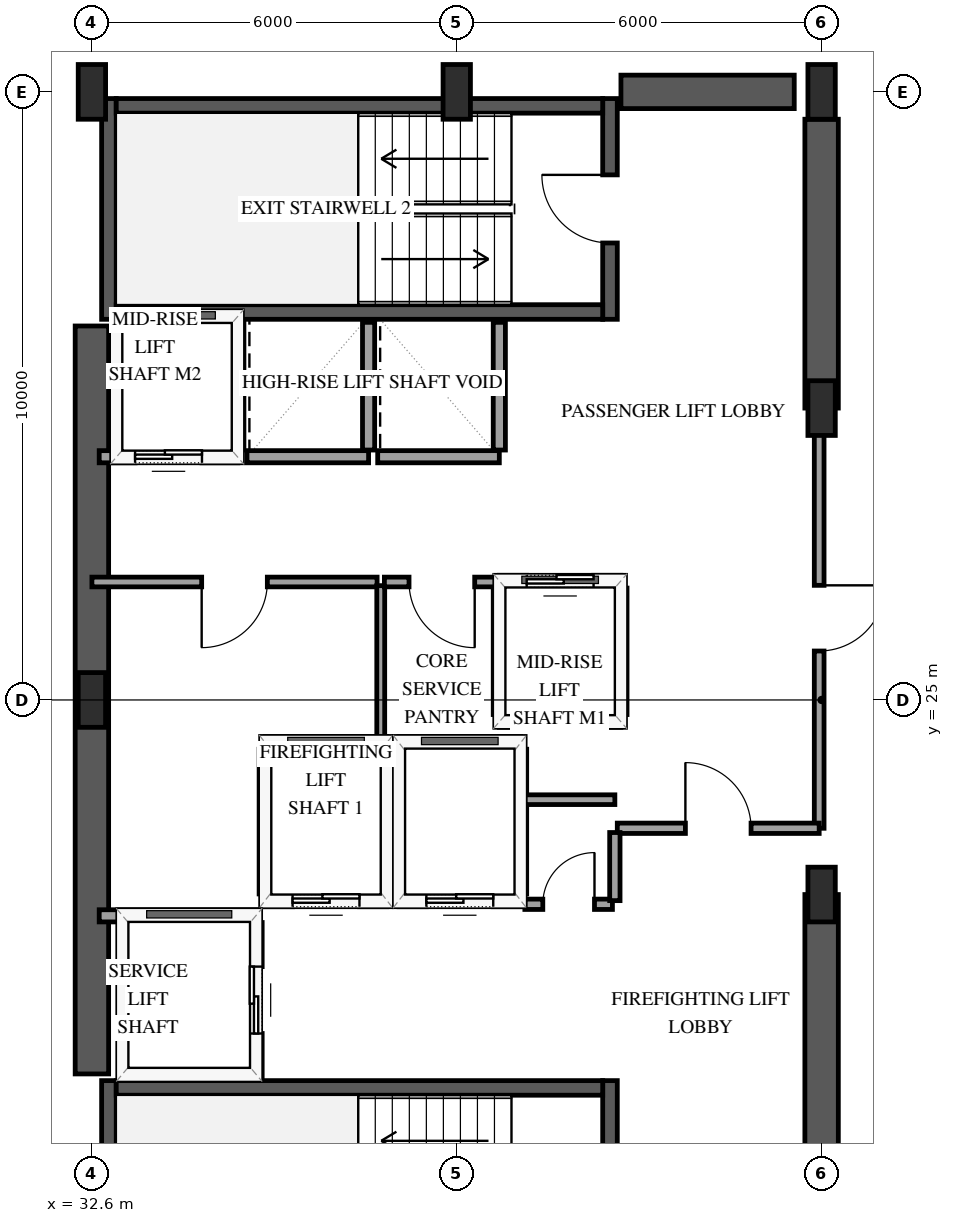
"""IFC4 building model, lengths in metres.
Left out: names, types, materials, properties, quantities, classifications, styles, units other than length and angle.
Written with IfcOpenShell. Run it as: python <this file> out.ifc"""

import sys

from ifc_helpers import new_model, si_unit, direction, frame, frame_2d, origin, origin_2d, place, context, subcontext, project, spatial, rectangle, extrude, element, fill, save


model = new_model("IFC4")
c1 = context("Model", 3, precision=1e-05, world=origin(), true_north=direction((0.0, 1.0)))
c2 = subcontext(c1, "Body", "Model", "MODEL_VIEW")
j1 = project(units=[si_unit("LENGTHUNIT", "METRE"), si_unit("PLANEANGLEUNIT", "RADIAN")], contexts=[c1])
p1 = place(None, origin())
s1 = spatial("IfcSite", under=j1, at=p1, CompositionType="ELEMENT")
p2 = place(p1, origin())
s2 = spatial("IfcBuilding", under=s1, at=p2, CompositionType="ELEMENT")
p3 = place(p2, frame((0.0, 0.0, 142.6)))
s3 = spatial("IfcBuildingStorey", under=s2, at=p3, CompositionType="ELEMENT", Elevation=142.6)
p4 = place(p3, frame((32.88, 15.11, 0.0), z_axis=(0.0, 0.0, 1.0), x_axis=(0.0, 1.0, 0.0)))
e1 = element("IfcWall", 1, at=p4, inside=s3, PredefinedType="SHEAR", context=c2, shape_type="SweptSolid", body=[
    extrude(rectangle(XDim=3.63, YDim=0.24, at=frame_2d((1.815, 0.0))), origin(), (0.0, 0.0, 1.0), 3.6),
])
p5 = place(p3, frame((41.12, 15.11, 0.0), z_axis=(0.0, 0.0, 1.0), x_axis=(0.0, 1.0, 0.0)))
e2 = element("IfcWall", 2, at=p5, inside=s3, PredefinedType="SHEAR", context=c2, shape_type="SweptSolid", body=[
    extrude(rectangle(XDim=3.63, YDim=0.24, at=frame_2d((1.815, 0.0))), origin(), (0.0, 0.0, 1.0), 3.6),
])
p6 = place(p5, frame((1.255, 0.0, 0.0)))
e3 = element("IfcOpeningElement", 3, at=p6, cuts=e2, PredefinedType="OPENING", context=c2, shape_type="SweptSolid", body=[
    extrude(rectangle(XDim=1.12, YDim=2.15, at=frame_2d((0.56, 1.075))), frame((0.0, 0.13, 0.0), z_axis=(0.0, -1.0, 0.0), x_axis=(1.0, 0.0, 0.0)), (0.0, 0.0, 1.0), 0.26),
])
p7 = place(p3, frame((33.0, 18.62, 0.0), z_axis=(0.0, 0.0, 1.0), x_axis=(1.0, 0.0, 0.0)))
e4 = element("IfcWall", 4, at=p7, inside=s3, PredefinedType="SHEAR", context=c2, shape_type="SweptSolid", body=[
    extrude(rectangle(XDim=8.0, YDim=0.24, at=frame_2d((4.0, 0.0))), origin(), (0.0, 0.0, 1.0), 3.6),
])
p8 = place(p3, frame((32.88, 31.26, 0.0), z_axis=(0.0, 0.0, 1.0), x_axis=(0.0, 1.0, 0.0)))
e5 = element("IfcWall", 5, at=p8, inside=s3, PredefinedType="SHEAR", context=c2, shape_type="SweptSolid", body=[
    extrude(rectangle(XDim=3.63, YDim=0.24, at=frame_2d((1.815, 0.0))), origin(), (0.0, 0.0, 1.0), 3.6),
])
p9 = place(p3, frame((41.12, 31.26, 0.0), z_axis=(0.0, 0.0, 1.0), x_axis=(0.0, 1.0, 0.0)))
e6 = element("IfcWall", 6, at=p9, inside=s3, PredefinedType="SHEAR", context=c2, shape_type="SweptSolid", body=[
    extrude(rectangle(XDim=3.63, YDim=0.24, at=frame_2d((1.815, 0.0))), origin(), (0.0, 0.0, 1.0), 3.6),
])
p10 = place(p9, frame((1.255, 0.0, 0.0)))
e7 = element("IfcOpeningElement", 7, at=p10, cuts=e6, PredefinedType="OPENING", context=c2, shape_type="SweptSolid", body=[
    extrude(rectangle(XDim=1.12, YDim=2.15, at=frame_2d((0.56, 1.075))), frame((0.0, 0.13, 0.0), z_axis=(0.0, -1.0, 0.0), x_axis=(1.0, 0.0, 0.0)), (0.0, 0.0, 1.0), 0.26),
])
for number, where, z_axis, x_axis in (
    (8, (33.0, 31.38, 0.0), (0.0, 0.0, 1.0), (1.0, 0.0, 0.0)),
    (9, (33.0, 34.77, 0.0), (0.0, 0.0, 1.0), (1.0, 0.0, 0.0)),
):
    element("IfcWall", number, at=place(p3, frame(where, z_axis=z_axis, x_axis=x_axis)), inside=s3, PredefinedType="SHEAR", context=c2, shape_type="SweptSolid", body=[
        extrude(rectangle(XDim=8.0, YDim=0.24, at=frame_2d((4.0, 0.0))), origin(), (0.0, 0.0, 1.0), 3.6),
    ])
p11 = place(p3, frame((32.6, 18.85, 0.0), z_axis=(0.0, 0.0, 1.0), x_axis=(0.0, 1.0, 0.0)))
e10 = element("IfcWall", 10, at=p11, inside=s3, PredefinedType="SHEAR", context=c2, shape_type="SweptSolid", body=[
    extrude(rectangle(XDim=12.3, YDim=0.55, at=frame_2d((6.15, 0.0))), origin(), (0.0, 0.0, 1.0), 3.6),
])
p12 = place(p3, frame((41.3, 35.0, 0.0), z_axis=(0.0, 0.0, 1.0), x_axis=(1.0, 0.0, 0.0)))
e11 = element("IfcWall", 11, at=p12, inside=s3, PredefinedType="SHEAR", context=c2, shape_type="SweptSolid", body=[
    extrude(rectangle(XDim=2.85, YDim=0.55, at=frame_2d((1.425, 0.0))), origin(), (0.0, 0.0, 1.0), 3.6),
])
p13 = place(p3, frame((44.6, 15.45, 0.0), z_axis=(0.0, 0.0, 1.0), x_axis=(0.0, 1.0, 0.0)))
e12 = element("IfcWall", 12, at=p13, inside=s3, PredefinedType="SHEAR", context=c2, shape_type="SweptSolid", body=[
    extrude(rectangle(XDim=6.35, YDim=0.55, at=frame_2d((3.175, 0.0))), origin(), (0.0, 0.0, 1.0), 3.6),
])
p14 = place(p3, frame((44.6, 29.8, 0.0), z_axis=(0.0, 0.0, 1.0), x_axis=(0.0, 1.0, 0.0)))
e13 = element("IfcWall", 13, at=p14, inside=s3, PredefinedType="SHEAR", context=c2, shape_type="SweptSolid", body=[
    extrude(rectangle(XDim=4.75, YDim=0.55, at=frame_2d((2.375, 0.0))), origin(), (0.0, 0.0, 1.0), 3.6),
])
for number, where, z_axis, x_axis in (
    (14, (32.6, 25.0, 0.0), (0.0, 0.0, 1.0), (1.0, 0.0, 0.0)),
    (15, (32.6, 35.0, 0.0), (0.0, 0.0, 1.0), (1.0, 0.0, 0.0)),
    (16, (38.6, 35.0, 0.0), (0.0, 0.0, 1.0), (1.0, 0.0, 0.0)),
    (17, (44.6, 21.8, 0.0), (0.0, 0.0, 1.0), (1.0, 0.0, 0.0)),
    (18, (44.6, 29.8, 0.0), (0.0, 0.0, 1.0), (1.0, 0.0, 0.0)),
    (19, (44.6, 35.0, 0.0), (0.0, 0.0, 1.0), (1.0, 0.0, 0.0)),
):
    element("IfcColumn", number, at=place(p3, frame(where, z_axis=z_axis, x_axis=x_axis)), inside=s3, PredefinedType="PILASTER", context=c2, shape_type="SweptSolid", body=[
        extrude(rectangle(XDim=0.45, YDim=0.9, at=origin_2d()), origin(), (0.0, 0.0, 1.0), 3.6),
    ])
p15 = place(p3, frame((35.45, 21.7, 0.0), z_axis=(0.0, 0.0, 1.0), x_axis=(1.0, 0.0, 0.0)))
e20 = element("IfcWall", 20, at=p15, inside=s3, PredefinedType="SOLIDWALL", context=c2, shape_type="SweptSolid", body=[
    extrude(rectangle(XDim=2.0, YDim=0.2, at=frame_2d((1.0, 0.0))), origin(), (0.0, 0.0, 1.0), 3.3),
])
p16 = place(p15, frame((0.45, 0.0, 0.0)))
e21 = element("IfcOpeningElement", 21, at=p16, cuts=e20, PredefinedType="OPENING", context=c2, shape_type="SweptSolid", body=[
    extrude(rectangle(XDim=1.1, YDim=2.15, at=frame_2d((0.55, 1.075))), frame((0.0, 0.11, 0.0), z_axis=(0.0, -1.0, 0.0), x_axis=(1.0, 0.0, 0.0)), (0.0, 0.0, 1.0), 0.22),
])
p17 = place(p3, frame((35.45, 24.3, 0.0), z_axis=(0.0, 0.0, 1.0), x_axis=(1.0, 0.0, 0.0)))
e22 = element("IfcWall", 22, at=p17, inside=s3, PredefinedType="SOLIDWALL", context=c2, shape_type="SweptSolid", body=[
    extrude(rectangle(XDim=2.0, YDim=0.2, at=frame_2d((1.0, 0.0))), origin(), (0.0, 0.0, 1.0), 3.3),
])
for number, where, z_axis, x_axis in (
    (23, (35.45, 21.81, 0.0), (0.0, 0.0, 1.0), (0.0, 1.0, 0.0)),
    (24, (37.45, 21.81, 0.0), (0.0, 0.0, 1.0), (0.0, 1.0, 0.0)),
):
    element("IfcWall", number, at=place(p3, frame(where, z_axis=z_axis, x_axis=x_axis)), inside=s3, PredefinedType="SOLIDWALL", context=c2, shape_type="SweptSolid", body=[
        extrude(rectangle(XDim=2.38, YDim=0.2, at=frame_2d((1.19, 0.0))), origin(), (0.0, 0.0, 1.0), 3.3),
    ])
p18 = place(p3, frame((37.65, 21.7, 0.0), z_axis=(0.0, 0.0, 1.0), x_axis=(1.0, 0.0, 0.0)))
e25 = element("IfcWall", 25, at=p18, inside=s3, PredefinedType="SOLIDWALL", context=c2, shape_type="SweptSolid", body=[
    extrude(rectangle(XDim=2.0, YDim=0.2, at=frame_2d((1.0, 0.0))), origin(), (0.0, 0.0, 1.0), 3.3),
])
p19 = place(p18, frame((0.45, 0.0, 0.0)))
e26 = element("IfcOpeningElement", 26, at=p19, cuts=e25, PredefinedType="OPENING", context=c2, shape_type="SweptSolid", body=[
    extrude(rectangle(XDim=1.1, YDim=2.15, at=frame_2d((0.55, 1.075))), frame((0.0, 0.11, 0.0), z_axis=(0.0, -1.0, 0.0), x_axis=(1.0, 0.0, 0.0)), (0.0, 0.0, 1.0), 0.22),
])
p20 = place(p3, frame((37.65, 24.3, 0.0), z_axis=(0.0, 0.0, 1.0), x_axis=(1.0, 0.0, 0.0)))
e27 = element("IfcWall", 27, at=p20, inside=s3, PredefinedType="SOLIDWALL", context=c2, shape_type="SweptSolid", body=[
    extrude(rectangle(XDim=2.0, YDim=0.2, at=frame_2d((1.0, 0.0))), origin(), (0.0, 0.0, 1.0), 3.3),
])
p21 = place(p3, frame((39.65, 21.81, 0.0), z_axis=(0.0, 0.0, 1.0), x_axis=(0.0, 1.0, 0.0)))
e28 = element("IfcWall", 28, at=p21, inside=s3, PredefinedType="SOLIDWALL", context=c2, shape_type="SweptSolid", body=[
    extrude(rectangle(XDim=2.38, YDim=0.2, at=frame_2d((1.19, 0.0))), origin(), (0.0, 0.0, 1.0), 3.3),
])
p22 = place(p3, frame((32.72, 21.45, 0.0), z_axis=(0.0, 0.0, 1.0), x_axis=(1.0, 0.0, 0.0)))
e29 = element("IfcWall", 29, at=p22, inside=s3, PredefinedType="SOLIDWALL", context=c2, shape_type="SweptSolid", body=[
    extrude(rectangle(XDim=2.58, YDim=0.2, at=frame_2d((1.29, 0.0))), origin(), (0.0, 0.0, 1.0), 3.3),
])
p23 = place(p3, frame((35.3, 18.79, 0.0), z_axis=(0.0, 0.0, 1.0), x_axis=(0.0, 1.0, 0.0)))
e30 = element("IfcWall", 30, at=p23, inside=s3, PredefinedType="SOLIDWALL", context=c2, shape_type="SweptSolid", body=[
    extrude(rectangle(XDim=2.55, YDim=0.2, at=frame_2d((1.275, 0.0))), origin(), (0.0, 0.0, 1.0), 3.3),
])
p24 = place(p23, frame((0.725, 0.0, 0.0)))
e31 = element("IfcOpeningElement", 31, at=p24, cuts=e30, PredefinedType="OPENING", context=c2, shape_type="SweptSolid", body=[
    extrude(rectangle(XDim=1.1, YDim=2.15, at=frame_2d((0.55, 1.075))), frame((0.0, 0.11, 0.0), z_axis=(0.0, -1.0, 0.0), x_axis=(1.0, 0.0, 0.0)), (0.0, 0.0, 1.0), 0.22),
])
p25 = place(p3, frame((39.3, 24.65, 0.0), z_axis=(0.0, 0.0, 1.0), x_axis=(1.0, 0.0, 0.0)))
e32 = element("IfcWall", 32, at=p25, inside=s3, PredefinedType="SOLIDWALL", context=c2, shape_type="SweptSolid", body=[
    extrude(rectangle(XDim=2.0, YDim=0.2, at=frame_2d((1.0, 0.0))), origin(), (0.0, 0.0, 1.0), 3.3),
])
p26 = place(p3, frame((39.3, 26.95, 0.0), z_axis=(0.0, 0.0, 1.0), x_axis=(1.0, 0.0, 0.0)))
e33 = element("IfcWall", 33, at=p26, inside=s3, PredefinedType="SOLIDWALL", context=c2, shape_type="SweptSolid", body=[
    extrude(rectangle(XDim=2.0, YDim=0.2, at=frame_2d((1.0, 0.0))), origin(), (0.0, 0.0, 1.0), 3.3),
])
p27 = place(p26, frame((0.45, 0.0, 0.0)))
e34 = element("IfcOpeningElement", 34, at=p27, cuts=e33, PredefinedType="OPENING", context=c2, shape_type="SweptSolid", body=[
    extrude(rectangle(XDim=1.1, YDim=2.15, at=frame_2d((0.55, 1.075))), frame((0.0, 0.11, 0.0), z_axis=(0.0, -1.0, 0.0), x_axis=(1.0, 0.0, 0.0)), (0.0, 0.0, 1.0), 0.22),
])
for number, where, z_axis, x_axis in (
    (35, (39.3, 24.76, 0.0), (0.0, 0.0, 1.0), (0.0, 1.0, 0.0)),
    (36, (41.3, 24.76, 0.0), (0.0, 0.0, 1.0), (0.0, 1.0, 0.0)),
):
    element("IfcWall", number, at=place(p3, frame(where, z_axis=z_axis, x_axis=x_axis)), inside=s3, PredefinedType="SOLIDWALL", context=c2, shape_type="SweptSolid", body=[
        extrude(rectangle(XDim=2.08, YDim=0.2, at=frame_2d((1.04, 0.0))), origin(), (0.0, 0.0, 1.0), 3.3),
    ])
p28 = place(p3, frame((32.72, 29.0, 0.0), z_axis=(0.0, 0.0, 1.0), x_axis=(1.0, 0.0, 0.0)))
e37 = element("IfcWall", 37, at=p28, inside=s3, PredefinedType="SOLIDWALL", context=c2, shape_type="SweptSolid", body=[
    extrude(rectangle(XDim=2.28, YDim=0.2, at=frame_2d((1.14, 0.0))), origin(), (0.0, 0.0, 1.0), 3.3),
])
p29 = place(p28, frame((0.59, 0.0, 0.0)))
e38 = element("IfcOpeningElement", 38, at=p29, cuts=e37, PredefinedType="OPENING", context=c2, shape_type="SweptSolid", body=[
    extrude(rectangle(XDim=1.1, YDim=2.15, at=frame_2d((0.55, 1.075))), frame((0.0, 0.11, 0.0), z_axis=(0.0, -1.0, 0.0), x_axis=(1.0, 0.0, 0.0)), (0.0, 0.0, 1.0), 0.22),
])
p30 = place(p3, frame((35.0, 29.11, 0.0), z_axis=(0.0, 0.0, 1.0), x_axis=(0.0, 1.0, 0.0)))
e39 = element("IfcWall", 39, at=p30, inside=s3, PredefinedType="SOLIDWALL", context=c2, shape_type="SweptSolid", body=[
    extrude(rectangle(XDim=2.1, YDim=0.2, at=frame_2d((1.05, 0.0))), origin(), (0.0, 0.0, 1.0), 3.3),
])
p31 = place(p3, frame((35.15, 29.0, 0.0), z_axis=(0.0, 0.0, 1.0), x_axis=(1.0, 0.0, 0.0)))
e40 = element("IfcWall", 40, at=p31, inside=s3, PredefinedType="SOLIDWALL", context=c2, shape_type="SweptSolid", body=[
    extrude(rectangle(XDim=2.0, YDim=0.2, at=frame_2d((1.0, 0.0))), origin(), (0.0, 0.0, 1.0), 3.3),
])
p32 = place(p3, frame((37.15, 29.11, 0.0), z_axis=(0.0, 0.0, 1.0), x_axis=(0.0, 1.0, 0.0)))
e41 = element("IfcWall", 41, at=p32, inside=s3, PredefinedType="SOLIDWALL", context=c2, shape_type="SweptSolid", body=[
    extrude(rectangle(XDim=2.1, YDim=0.2, at=frame_2d((1.05, 0.0))), origin(), (0.0, 0.0, 1.0), 3.3),
])
p33 = place(p3, frame((37.3, 29.0, 0.0), z_axis=(0.0, 0.0, 1.0), x_axis=(1.0, 0.0, 0.0)))
e42 = element("IfcWall", 42, at=p33, inside=s3, PredefinedType="SOLIDWALL", context=c2, shape_type="SweptSolid", body=[
    extrude(rectangle(XDim=2.0, YDim=0.2, at=frame_2d((1.0, 0.0))), origin(), (0.0, 0.0, 1.0), 3.3),
])
p34 = place(p3, frame((39.3, 29.11, 0.0), z_axis=(0.0, 0.0, 1.0), x_axis=(0.0, 1.0, 0.0)))
e43 = element("IfcWall", 43, at=p34, inside=s3, PredefinedType="SOLIDWALL", context=c2, shape_type="SweptSolid", body=[
    extrude(rectangle(XDim=2.1, YDim=0.2, at=frame_2d((1.05, 0.0))), origin(), (0.0, 0.0, 1.0), 3.3),
])
p35 = place(p3, frame((44.56, 29.8, 0.0), z_axis=(0.0, 0.0, 1.0), x_axis=(0.0, -1.0, 0.0)))
e44 = element("IfcWall", 44, at=p35, inside=s3, PredefinedType="PARTITIONING", context=c2, shape_type="SweptSolid", body=[
    extrude(rectangle(XDim=6.91, YDim=0.16, at=frame_2d((3.455, 0.0))), origin(), (0.0, 0.0, 1.0), 2.34),
])
p36 = place(p35, frame((2.915, 0.0, 0.0)))
e45 = element("IfcOpeningElement", 45, at=p36, cuts=e44, PredefinedType="OPENING", context=c2, shape_type="SweptSolid", body=[
    extrude(rectangle(XDim=1.08, YDim=2.15, at=frame_2d((0.54, 1.075))), frame((0.0, 0.09, 0.0), z_axis=(0.0, -1.0, 0.0), x_axis=(1.0, 0.0, 0.0)), (0.0, 0.0, 1.0), 0.18),
])
p37 = place(p3, frame((37.29, 26.94, 0.0), z_axis=(0.0, 0.0, 1.0), x_axis=(-1.0, 0.0, 0.0)))
e46 = element("IfcWall", 46, at=p37, inside=s3, PredefinedType="PARTITIONING", context=c2, shape_type="SweptSolid", body=[
    extrude(rectangle(XDim=4.69, YDim=0.16, at=frame_2d((2.345, 0.0))), origin(), (0.0, 0.0, 1.0), 3.3),
])
p38 = place(p37, frame((1.805, 0.0, 0.0)))
e47 = element("IfcOpeningElement", 47, at=p38, cuts=e46, PredefinedType="OPENING", context=c2, shape_type="SweptSolid", body=[
    extrude(rectangle(XDim=1.08, YDim=2.15, at=frame_2d((0.54, 1.075))), frame((0.0, 0.09, 0.0), z_axis=(0.0, -1.0, 0.0), x_axis=(1.0, 0.0, 0.0)), (0.0, 0.0, 1.0), 0.18),
])
p39 = place(p3, frame((41.24, 22.89, 0.0), z_axis=(0.0, 0.0, 1.0), x_axis=(1.0, 0.0, 0.0)))
e48 = element("IfcWall", 48, at=p39, inside=s3, PredefinedType="PARTITIONING", context=c2, shape_type="SweptSolid", body=[
    extrude(rectangle(XDim=3.32, YDim=0.17, at=frame_2d((1.66, 0.0))), origin(), (0.0, 0.0, 1.0), 3.3),
])
p40 = place(p39, frame((1.12, 0.0, 0.0)))
e49 = element("IfcOpeningElement", 49, at=p40, cuts=e48, PredefinedType="OPENING", context=c2, shape_type="SweptSolid", body=[
    extrude(rectangle(XDim=1.08, YDim=2.15, at=frame_2d((0.54, 1.075))), frame((0.0, 0.095, 0.0), z_axis=(0.0, -1.0, 0.0), x_axis=(1.0, 0.0, 0.0)), (0.0, 0.0, 1.0), 0.19),
])
p41 = place(p3, frame((37.35, 26.88, 0.0), z_axis=(0.0, 0.0, 1.0), x_axis=(0.0, -1.0, 0.0)))
e50 = element("IfcWall", 50, at=p41, inside=s3, PredefinedType="PARTITIONING", context=c2, shape_type="SweptSolid", body=[
    extrude(rectangle(XDim=2.58, YDim=0.13, at=frame_2d((1.29, 0.0))), origin(), (0.0, 0.0, 1.0), 3.3),
])
p42 = place(p3, frame((39.3, 26.94, 0.0), z_axis=(0.0, 0.0, 1.0), x_axis=(-1.0, 0.0, 0.0)))
e51 = element("IfcWall", 51, at=p42, inside=s3, PredefinedType="PARTITIONING", context=c2, shape_type="SweptSolid", body=[
    extrude(rectangle(XDim=1.89, YDim=0.16, at=frame_2d((0.945, 0.0))), origin(), (0.0, 0.0, 1.0), 3.3),
])
p43 = place(p42, frame((0.405, 0.0, 0.0)))
e52 = element("IfcOpeningElement", 52, at=p43, cuts=e51, PredefinedType="OPENING", context=c2, shape_type="SweptSolid", body=[
    extrude(rectangle(XDim=1.08, YDim=2.15, at=frame_2d((0.54, 1.075))), frame((0.0, 0.09, 0.0), z_axis=(0.0, -1.0, 0.0), x_axis=(1.0, 0.0, 0.0)), (0.0, 0.0, 1.0), 0.18),
])
p44 = place(p3, frame((39.72, 21.64, 0.0), z_axis=(0.0, 0.0, 1.0), x_axis=(1.0, 0.0, 0.0)))
e53 = element("IfcWall", 53, at=p44, inside=s3, PredefinedType="PARTITIONING", context=c2, shape_type="SweptSolid", body=[
    extrude(rectangle(XDim=1.44, YDim=0.17, at=frame_2d((0.72, 0.0))), origin(), (0.0, 0.0, 1.0), 3.3),
])
p45 = place(p44, frame((0.295, 0.0, 0.0)))
e54 = element("IfcOpeningElement", 54, at=p45, cuts=e53, PredefinedType="OPENING", context=c2, shape_type="SweptSolid", body=[
    extrude(rectangle(XDim=0.85, YDim=2.1, at=frame_2d((0.425, 1.05))), frame((0.0, 0.095, 0.0), z_axis=(0.0, -1.0, 0.0), x_axis=(1.0, 0.0, 0.0)), (0.0, 0.0, 1.0), 0.19),
])
p46 = place(p3, frame((41.2, 21.7, 0.0), z_axis=(0.0, 0.0, 1.0), x_axis=(0.0, 1.0, 0.0)))
e55 = element("IfcWall", 55, at=p46, inside=s3, PredefinedType="PARTITIONING", context=c2, shape_type="SweptSolid", body=[
    extrude(rectangle(XDim=1.12, YDim=0.17, at=frame_2d((0.56, 0.0))), origin(), (0.0, 0.0, 1.0), 3.3),
])
p47 = place(p3, frame((41.2, 23.36, 0.0), z_axis=(0.0, 0.0, 1.0), x_axis=(-1.0, 0.0, 0.0)))
e56 = element("IfcWall", 56, at=p47, inside=s3, PredefinedType="PARTITIONING", context=c2, shape_type="SweptSolid", body=[
    extrude(rectangle(XDim=1.48, YDim=0.16, at=frame_2d((0.74, 0.0))), origin(), (0.0, 0.0, 1.0), 3.3),
])
p48 = place(p16, origin())
e57 = element("IfcDoor", 57, at=p48, inside=s3, OperationType="SLIDING_TO_LEFT", PredefinedType="DOOR", context=c2, shape_type="SweptSolid", body=[
    extrude(rectangle(XDim=1.1, YDim=2.15, at=frame_2d((0.55, 1.075))), frame((0.0, 0.025, 0.0), z_axis=(0.0, -1.0, 0.0), x_axis=(1.0, 0.0, 0.0)), (0.0, 0.0, 1.0), 0.05),
])
fill(e21, e57)
p49 = place(p19, origin())
e58 = element("IfcDoor", 58, at=p49, inside=s3, OperationType="SLIDING_TO_LEFT", PredefinedType="DOOR", context=c2, shape_type="SweptSolid", body=[
    extrude(rectangle(XDim=1.1, YDim=2.15, at=frame_2d((0.55, 1.075))), frame((0.0, 0.025, 0.0), z_axis=(0.0, -1.0, 0.0), x_axis=(1.0, 0.0, 0.0)), (0.0, 0.0, 1.0), 0.05),
])
fill(e26, e58)
p50 = place(p24, origin())
e59 = element("IfcDoor", 59, at=p50, inside=s3, OperationType="SLIDING_TO_LEFT", PredefinedType="DOOR", context=c2, shape_type="SweptSolid", body=[
    extrude(rectangle(XDim=1.1, YDim=2.15, at=frame_2d((0.55, 1.075))), frame((0.0, 0.025, 0.0), z_axis=(0.0, -1.0, 0.0), x_axis=(1.0, 0.0, 0.0)), (0.0, 0.0, 1.0), 0.05),
])
fill(e31, e59)
p51 = place(p27, origin())
e60 = element("IfcDoor", 60, at=p51, inside=s3, OperationType="SLIDING_TO_LEFT", PredefinedType="DOOR", context=c2, shape_type="SweptSolid", body=[
    extrude(rectangle(XDim=1.1, YDim=2.15, at=frame_2d((0.55, 1.075))), frame((0.0, 0.025, 0.0), z_axis=(0.0, -1.0, 0.0), x_axis=(1.0, 0.0, 0.0)), (0.0, 0.0, 1.0), 0.05),
])
fill(e34, e60)
p52 = place(p29, origin())
e61 = element("IfcDoor", 61, at=p52, inside=s3, OperationType="SLIDING_TO_LEFT", PredefinedType="DOOR", context=c2, shape_type="SweptSolid", body=[
    extrude(rectangle(XDim=1.1, YDim=2.15, at=frame_2d((0.55, 1.075))), frame((0.0, 0.025, 0.0), z_axis=(0.0, -1.0, 0.0), x_axis=(1.0, 0.0, 0.0)), (0.0, 0.0, 1.0), 0.05),
])
fill(e38, e61)
p53 = place(p10, origin())
e62 = element("IfcDoor", 62, at=p53, inside=s3, OperationType="SINGLE_SWING_RIGHT", PredefinedType="DOOR", context=c2, shape_type="SweptSolid", body=[
    extrude(rectangle(XDim=1.12, YDim=2.15, at=frame_2d((0.56, 1.075))), frame((0.0, 0.025, 0.0), z_axis=(0.0, -1.0, 0.0), x_axis=(1.0, 0.0, 0.0)), (0.0, 0.0, 1.0), 0.05),
])
fill(e7, e62)
p54 = place(p36, origin())
e63 = element("IfcDoor", 63, at=p54, inside=s3, OperationType="SINGLE_SWING_LEFT", PredefinedType="DOOR", context=c2, shape_type="SweptSolid", body=[
    extrude(rectangle(XDim=1.08, YDim=2.15, at=frame_2d((0.54, 1.075))), frame((0.0, 0.025, 0.0), z_axis=(0.0, -1.0, 0.0), x_axis=(1.0, 0.0, 0.0)), (0.0, 0.0, 1.0), 0.05),
])
fill(e45, e63)
p55 = place(p38, origin())
e64 = element("IfcDoor", 64, at=p55, inside=s3, OperationType="SINGLE_SWING_RIGHT", PredefinedType="DOOR", context=c2, shape_type="SweptSolid", body=[
    extrude(rectangle(XDim=1.08, YDim=2.15, at=frame_2d((0.54, 1.075))), frame((0.0, 0.025, 0.0), z_axis=(0.0, -1.0, 0.0), x_axis=(1.0, 0.0, 0.0)), (0.0, 0.0, 1.0), 0.05),
])
fill(e47, e64)
p56 = place(p40, origin())
e65 = element("IfcDoor", 65, at=p56, inside=s3, OperationType="SINGLE_SWING_LEFT", PredefinedType="DOOR", context=c2, shape_type="SweptSolid", body=[
    extrude(rectangle(XDim=1.08, YDim=2.15, at=frame_2d((0.54, 1.075))), frame((0.0, 0.025, 0.0), z_axis=(0.0, -1.0, 0.0), x_axis=(1.0, 0.0, 0.0)), (0.0, 0.0, 1.0), 0.05),
])
fill(e49, e65)
p57 = place(p43, origin())
e66 = element("IfcDoor", 66, at=p57, inside=s3, OperationType="SINGLE_SWING_LEFT", PredefinedType="DOOR", context=c2, shape_type="SweptSolid", body=[
    extrude(rectangle(XDim=1.08, YDim=2.15, at=frame_2d((0.54, 1.075))), frame((0.0, 0.025, 0.0), z_axis=(0.0, -1.0, 0.0), x_axis=(1.0, 0.0, 0.0)), (0.0, 0.0, 1.0), 0.05),
])
fill(e52, e66)
p58 = place(p45, origin())
e67 = element("IfcDoor", 67, at=p58, inside=s3, OperationType="SINGLE_SWING_RIGHT", PredefinedType="DOOR", context=c2, shape_type="SweptSolid", body=[
    extrude(rectangle(XDim=0.85, YDim=2.1, at=frame_2d((0.425, 1.05))), frame((0.0, 0.025, 0.0), z_axis=(0.0, -1.0, 0.0), x_axis=(1.0, 0.0, 0.0)), (0.0, 0.0, 1.0), 0.05),
])
fill(e54, e67)
save(model, sys.argv[1])
